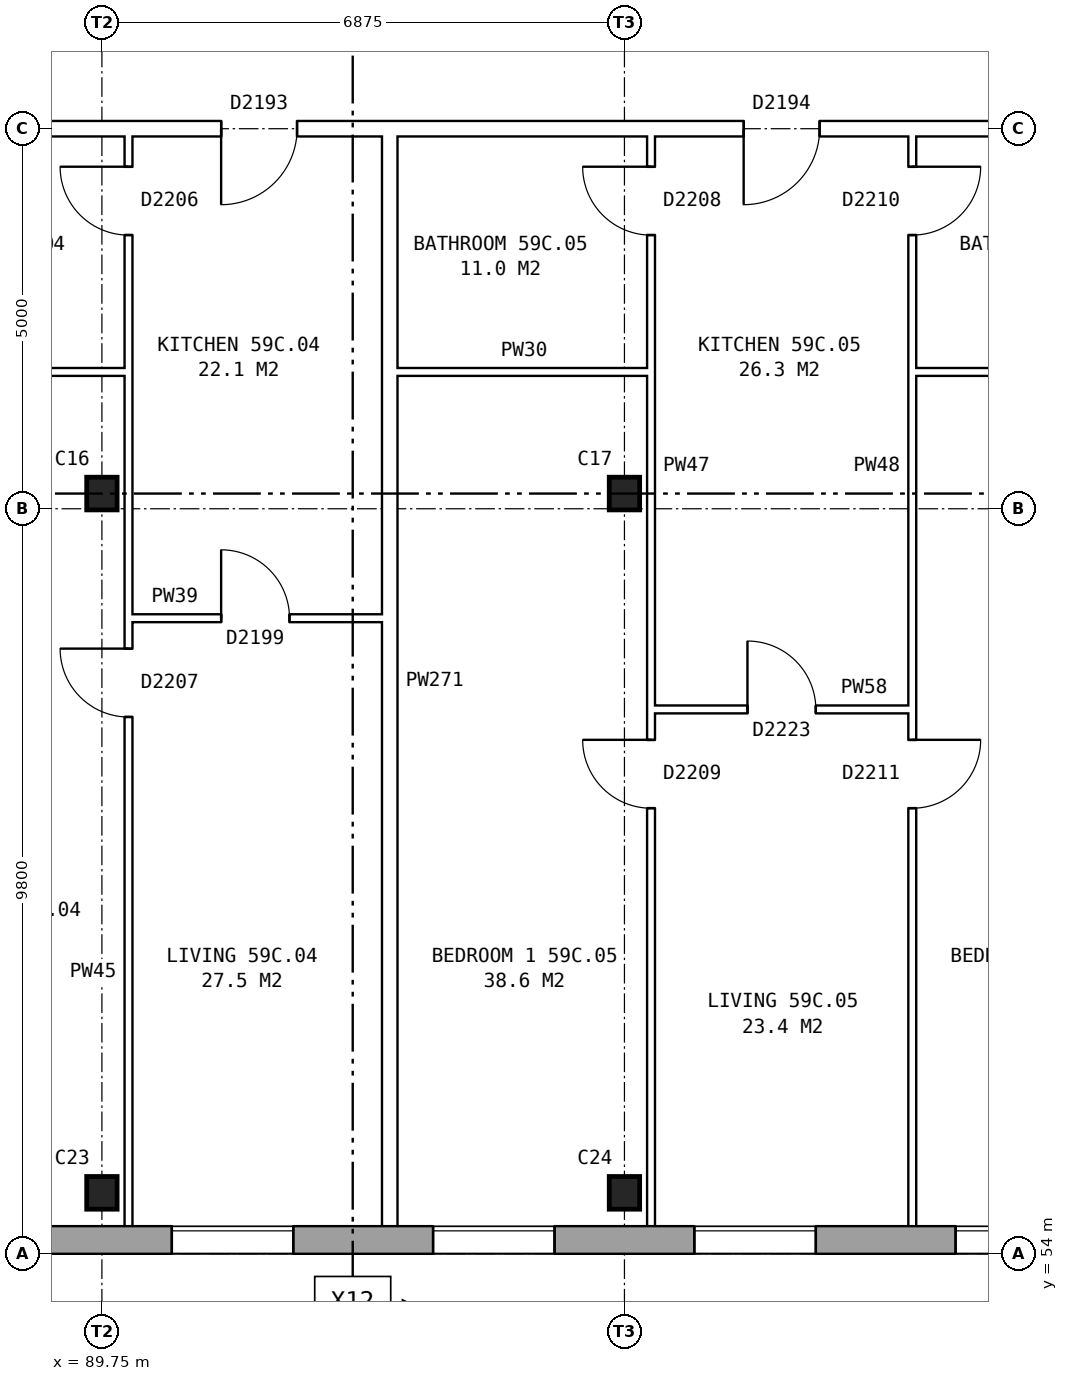
"""IFC4 building model, lengths in metres.
Left out: names, types, materials, properties, quantities, classifications, styles, units other than length and angle.
Written with IfcOpenShell. Run it as: python <this file> out.ifc"""

import sys

from ifc_helpers import new_model, si_unit, direction, frame, frame_2d, origin, origin_2d, place, context, subcontext, project, spatial, rectangle, i_section, extrude, element, fill, save


model = new_model("IFC4")
c1 = context("Model", 3, precision=1e-05, world=origin(), true_north=direction((0.0, 1.0)))
c2 = subcontext(c1, "Body", "Model", "MODEL_VIEW")
j1 = project(units=[si_unit("LENGTHUNIT", "METRE"), si_unit("PLANEANGLEUNIT", "RADIAN")], contexts=[c1])
p1 = place(None, origin())
s1 = spatial("IfcSite", under=j1, at=p1, CompositionType="ELEMENT")
p2 = place(p1, origin())
s2 = spatial("IfcBuilding", under=s1, at=p2, CompositionType="ELEMENT")
p3 = place(p2, frame((0.0, 0.0, 209.0)))
s3 = spatial("IfcBuildingStorey", under=s2, at=p3, CompositionType="ELEMENT", Elevation=209.0)
for number, where, z_axis, x_axis in (
    (1, (89.75, 54.8, 0.0), (0.0, 0.0, 1.0), (1.0, 0.0, 0.0)),
    (2, (96.625, 54.8, 0.0), (0.0, 0.0, 1.0), (1.0, 0.0, 0.0)),
    (3, (89.75, 64.0, 0.0), (0.0, 0.0, 1.0), (1.0, 0.0, 0.0)),
    (4, (96.625, 64.0, 0.0), (0.0, 0.0, 1.0), (1.0, 0.0, 0.0)),
):
    element("IfcColumn", number, at=place(p3, frame(where, z_axis=z_axis, x_axis=x_axis)), inside=s3, PredefinedType="COLUMN", context=c2, shape_type="SweptSolid", body=[
        extrude(i_section(OverallWidth=0.4, OverallDepth=0.43, WebThickness=0.04, FlangeThickness=0.04, at=origin_2d()), origin(), (0.0, 0.0, 1.0), 2.85),
    ])
p4 = place(p3, frame((75.95, 54.18, 0.0), z_axis=(0.0, 0.0, 1.0), x_axis=(1.0, 0.0, 0.0)))
e5 = element("IfcWall", 5, at=p4, inside=s3, PredefinedType="STANDARD", context=c2, shape_type="SweptSolid", body=[
    extrude(rectangle(XDim=55.1, YDim=0.36, at=frame_2d((27.55, 0.0))), origin(), (0.0, 0.0, 1.0), 2.85),
])
p5 = place(p4, frame((0.969, 0.0, 0.8)))
e6 = element("IfcOpeningElement", 6, at=p5, cuts=e5, PredefinedType="OPENING", context=c2, shape_type="SweptSolid", body=[
    extrude(rectangle(XDim=1.6, YDim=1.8, at=frame_2d((0.8, 0.9))), frame((0.0, 0.19, 0.0), z_axis=(0.0, -1.0, 0.0), x_axis=(1.0, 0.0, 0.0)), (0.0, 0.0, 1.0), 0.38),
])
p6 = place(p4, frame((4.406, 0.0, 0.8)))
e7 = element("IfcOpeningElement", 7, at=p6, cuts=e5, PredefinedType="OPENING", context=c2, shape_type="SweptSolid", body=[
    extrude(rectangle(XDim=1.6, YDim=1.8, at=frame_2d((0.8, 0.9))), frame((0.0, 0.19, 0.0), z_axis=(0.0, -1.0, 0.0), x_axis=(1.0, 0.0, 0.0)), (0.0, 0.0, 1.0), 0.38),
])
p7 = place(p4, frame((7.844, 0.0, 0.8)))
e8 = element("IfcOpeningElement", 8, at=p7, cuts=e5, PredefinedType="OPENING", context=c2, shape_type="SweptSolid", body=[
    extrude(rectangle(XDim=1.6, YDim=1.8, at=frame_2d((0.8, 0.9))), frame((0.0, 0.19, 0.0), z_axis=(0.0, -1.0, 0.0), x_axis=(1.0, 0.0, 0.0)), (0.0, 0.0, 1.0), 0.38),
])
p8 = place(p4, frame((11.281, 0.0, 0.8)))
e9 = element("IfcOpeningElement", 9, at=p8, cuts=e5, PredefinedType="OPENING", context=c2, shape_type="SweptSolid", body=[
    extrude(rectangle(XDim=1.6, YDim=1.8, at=frame_2d((0.8, 0.9))), frame((0.0, 0.19, 0.0), z_axis=(0.0, -1.0, 0.0), x_axis=(1.0, 0.0, 0.0)), (0.0, 0.0, 1.0), 0.38),
])
p9 = place(p4, frame((14.719, 0.0, 0.8)))
e10 = element("IfcOpeningElement", 10, at=p9, cuts=e5, PredefinedType="OPENING", context=c2, shape_type="SweptSolid", body=[
    extrude(rectangle(XDim=1.6, YDim=1.8, at=frame_2d((0.8, 0.9))), frame((0.0, 0.19, 0.0), z_axis=(0.0, -1.0, 0.0), x_axis=(1.0, 0.0, 0.0)), (0.0, 0.0, 1.0), 0.38),
])
p10 = place(p4, frame((18.156, 0.0, 0.8)))
e11 = element("IfcOpeningElement", 11, at=p10, cuts=e5, PredefinedType="OPENING", context=c2, shape_type="SweptSolid", body=[
    extrude(rectangle(XDim=1.6, YDim=1.8, at=frame_2d((0.8, 0.9))), frame((0.0, 0.19, 0.0), z_axis=(0.0, -1.0, 0.0), x_axis=(1.0, 0.0, 0.0)), (0.0, 0.0, 1.0), 0.38),
])
p11 = place(p4, frame((21.594, 0.0, 0.8)))
e12 = element("IfcOpeningElement", 12, at=p11, cuts=e5, PredefinedType="OPENING", context=c2, shape_type="SweptSolid", body=[
    extrude(rectangle(XDim=1.6, YDim=1.8, at=frame_2d((0.8, 0.9))), frame((0.0, 0.19, 0.0), z_axis=(0.0, -1.0, 0.0), x_axis=(1.0, 0.0, 0.0)), (0.0, 0.0, 1.0), 0.38),
])
p12 = place(p4, frame((25.031, 0.0, 0.8)))
e13 = element("IfcOpeningElement", 13, at=p12, cuts=e5, PredefinedType="OPENING", context=c2, shape_type="SweptSolid", body=[
    extrude(rectangle(XDim=1.6, YDim=1.8, at=frame_2d((0.8, 0.9))), frame((0.0, 0.19, 0.0), z_axis=(0.0, -1.0, 0.0), x_axis=(1.0, 0.0, 0.0)), (0.0, 0.0, 1.0), 0.38),
])
p13 = place(p4, frame((28.469, 0.0, 0.8)))
e14 = element("IfcOpeningElement", 14, at=p13, cuts=e5, PredefinedType="OPENING", context=c2, shape_type="SweptSolid", body=[
    extrude(rectangle(XDim=1.6, YDim=1.8, at=frame_2d((0.8, 0.9))), frame((0.0, 0.19, 0.0), z_axis=(0.0, -1.0, 0.0), x_axis=(1.0, 0.0, 0.0)), (0.0, 0.0, 1.0), 0.38),
])
p14 = place(p4, frame((31.906, 0.0, 0.8)))
e15 = element("IfcOpeningElement", 15, at=p14, cuts=e5, PredefinedType="OPENING", context=c2, shape_type="SweptSolid", body=[
    extrude(rectangle(XDim=1.6, YDim=1.8, at=frame_2d((0.8, 0.9))), frame((0.0, 0.19, 0.0), z_axis=(0.0, -1.0, 0.0), x_axis=(1.0, 0.0, 0.0)), (0.0, 0.0, 1.0), 0.38),
])
p15 = place(p4, frame((35.344, 0.0, 0.8)))
e16 = element("IfcOpeningElement", 16, at=p15, cuts=e5, PredefinedType="OPENING", context=c2, shape_type="SweptSolid", body=[
    extrude(rectangle(XDim=1.6, YDim=1.8, at=frame_2d((0.8, 0.9))), frame((0.0, 0.19, 0.0), z_axis=(0.0, -1.0, 0.0), x_axis=(1.0, 0.0, 0.0)), (0.0, 0.0, 1.0), 0.38),
])
p16 = place(p4, frame((38.781, 0.0, 0.8)))
e17 = element("IfcOpeningElement", 17, at=p16, cuts=e5, PredefinedType="OPENING", context=c2, shape_type="SweptSolid", body=[
    extrude(rectangle(XDim=1.6, YDim=1.8, at=frame_2d((0.8, 0.9))), frame((0.0, 0.19, 0.0), z_axis=(0.0, -1.0, 0.0), x_axis=(1.0, 0.0, 0.0)), (0.0, 0.0, 1.0), 0.38),
])
p17 = place(p4, frame((42.219, 0.0, 0.8)))
e18 = element("IfcOpeningElement", 18, at=p17, cuts=e5, PredefinedType="OPENING", context=c2, shape_type="SweptSolid", body=[
    extrude(rectangle(XDim=1.6, YDim=1.8, at=frame_2d((0.8, 0.9))), frame((0.0, 0.19, 0.0), z_axis=(0.0, -1.0, 0.0), x_axis=(1.0, 0.0, 0.0)), (0.0, 0.0, 1.0), 0.38),
])
p18 = place(p4, frame((45.656, 0.0, 0.8)))
e19 = element("IfcOpeningElement", 19, at=p18, cuts=e5, PredefinedType="OPENING", context=c2, shape_type="SweptSolid", body=[
    extrude(rectangle(XDim=1.6, YDim=1.8, at=frame_2d((0.8, 0.9))), frame((0.0, 0.19, 0.0), z_axis=(0.0, -1.0, 0.0), x_axis=(1.0, 0.0, 0.0)), (0.0, 0.0, 1.0), 0.38),
])
p19 = place(p4, frame((49.094, 0.0, 0.8)))
e20 = element("IfcOpeningElement", 20, at=p19, cuts=e5, PredefinedType="OPENING", context=c2, shape_type="SweptSolid", body=[
    extrude(rectangle(XDim=1.6, YDim=1.8, at=frame_2d((0.8, 0.9))), frame((0.0, 0.19, 0.0), z_axis=(0.0, -1.0, 0.0), x_axis=(1.0, 0.0, 0.0)), (0.0, 0.0, 1.0), 0.38),
])
p20 = place(p4, frame((52.531, 0.0, 0.8)))
e21 = element("IfcOpeningElement", 21, at=p20, cuts=e5, PredefinedType="OPENING", context=c2, shape_type="SweptSolid", body=[
    extrude(rectangle(XDim=1.6, YDim=1.8, at=frame_2d((0.8, 0.9))), frame((0.0, 0.19, 0.0), z_axis=(0.0, -1.0, 0.0), x_axis=(1.0, 0.0, 0.0)), (0.0, 0.0, 1.0), 0.38),
])
p21 = place(p3, frame((96.975, 61.16, 0.0), z_axis=(0.0, 0.0, 1.0), x_axis=(1.0, 0.0, 0.0)))
e22 = element("IfcWall", 22, at=p21, inside=s3, PredefinedType="PARTITIONING", context=c2, shape_type="SweptSolid", body=[
    extrude(rectangle(XDim=3.437, YDim=0.1, at=frame_2d((1.719, 0.0))), origin(), (0.0, 0.0, 1.0), 2.85),
])
p22 = place(p21, frame((1.269, 0.0, 0.0)))
e23 = element("IfcOpeningElement", 23, at=p22, cuts=e22, PredefinedType="OPENING", context=c2, shape_type="SweptSolid", body=[
    extrude(rectangle(XDim=0.9, YDim=2.1, at=frame_2d((0.45, 1.05))), frame((0.0, 0.06, 0.0), z_axis=(0.0, -1.0, 0.0), x_axis=(1.0, 0.0, 0.0)), (0.0, 0.0, 1.0), 0.12),
])
p23 = place(p3, frame((90.1, 62.36, 0.0), z_axis=(0.0, 0.0, 1.0), x_axis=(1.0, 0.0, 0.0)))
e24 = element("IfcWall", 24, at=p23, inside=s3, PredefinedType="PARTITIONING", context=c2, shape_type="SweptSolid", body=[
    extrude(rectangle(XDim=3.337, YDim=0.1, at=frame_2d((1.668, 0.0))), origin(), (0.0, 0.0, 1.0), 2.85),
])
p24 = place(p23, frame((1.219, 0.0, 0.0)))
e25 = element("IfcOpeningElement", 25, at=p24, cuts=e24, PredefinedType="OPENING", context=c2, shape_type="SweptSolid", body=[
    extrude(rectangle(XDim=0.9, YDim=2.1, at=frame_2d((0.45, 1.05))), frame((0.0, 0.06, 0.0), z_axis=(0.0, -1.0, 0.0), x_axis=(1.0, 0.0, 0.0)), (0.0, 0.0, 1.0), 0.12),
])
for number, where, z_axis, x_axis in (
    (26, (86.762, 65.6, 0.0), (0.0, 0.0, 1.0), (1.0, 0.0, 0.0)),
    (27, (93.637, 65.6, 0.0), (0.0, 0.0, 1.0), (1.0, 0.0, 0.0)),
):
    element("IfcWall", number, at=place(p3, frame(where, z_axis=z_axis, x_axis=x_axis)), inside=s3, PredefinedType="PARTITIONING", context=c2, shape_type="SweptSolid", body=[
        extrude(rectangle(XDim=3.338, YDim=0.1, at=frame_2d((1.669, 0.0))), origin(), (0.0, 0.0, 1.0), 2.85),
    ])
p25 = place(p3, frame((100.412, 65.6, 0.0), z_axis=(0.0, 0.0, 1.0), x_axis=(1.0, 0.0, 0.0)))
e28 = element("IfcWall", 28, at=p25, inside=s3, PredefinedType="PARTITIONING", context=c2, shape_type="SweptSolid", body=[
    extrude(rectangle(XDim=6.875, YDim=0.1, at=frame_2d((3.438, 0.0))), origin(), (0.0, 0.0, 1.0), 2.85),
])
p26 = place(p3, frame((75.64, 68.8, 0.0), z_axis=(0.0, 0.0, 1.0), x_axis=(1.0, 0.0, 0.0)))
e29 = element("IfcWall", 29, at=p26, inside=s3, PredefinedType="PARTITIONING", context=c2, shape_type="SweptSolid", body=[
    extrude(rectangle(XDim=55.72, YDim=0.2, at=frame_2d((27.86, 0.0))), origin(), (0.0, 0.0, 1.0), 2.85),
])
p27 = place(p26, frame((5.191, 0.0, 0.0)))
e30 = element("IfcOpeningElement", 30, at=p27, cuts=e29, PredefinedType="OPENING", context=c2, shape_type="SweptSolid", body=[
    extrude(rectangle(XDim=1.0, YDim=2.1, at=frame_2d((0.5, 1.05))), frame((0.0, 0.11, 0.0), z_axis=(0.0, -1.0, 0.0), x_axis=(1.0, 0.0, 0.0)), (0.0, 0.0, 1.0), 0.22),
])
p28 = place(p26, frame((15.678, 0.0, 0.0)))
e31 = element("IfcOpeningElement", 31, at=p28, cuts=e29, PredefinedType="OPENING", context=c2, shape_type="SweptSolid", body=[
    extrude(rectangle(XDim=1.0, YDim=2.1, at=frame_2d((0.5, 1.05))), frame((0.0, 0.11, 0.0), z_axis=(0.0, -1.0, 0.0), x_axis=(1.0, 0.0, 0.0)), (0.0, 0.0, 1.0), 0.22),
])
p29 = place(p26, frame((22.553, 0.0, 0.0)))
e32 = element("IfcOpeningElement", 32, at=p29, cuts=e29, PredefinedType="OPENING", context=c2, shape_type="SweptSolid", body=[
    extrude(rectangle(XDim=1.0, YDim=2.1, at=frame_2d((0.5, 1.05))), frame((0.0, 0.11, 0.0), z_axis=(0.0, -1.0, 0.0), x_axis=(1.0, 0.0, 0.0)), (0.0, 0.0, 1.0), 0.22),
])
p30 = place(p26, frame((32.866, 0.0, 0.0)))
e33 = element("IfcOpeningElement", 33, at=p30, cuts=e29, PredefinedType="OPENING", context=c2, shape_type="SweptSolid", body=[
    extrude(rectangle(XDim=1.0, YDim=2.1, at=frame_2d((0.5, 1.05))), frame((0.0, 0.11, 0.0), z_axis=(0.0, -1.0, 0.0), x_axis=(1.0, 0.0, 0.0)), (0.0, 0.0, 1.0), 0.22),
])
p31 = place(p26, frame((43.178, 0.0, 0.0)))
e34 = element("IfcOpeningElement", 34, at=p31, cuts=e29, PredefinedType="OPENING", context=c2, shape_type="SweptSolid", body=[
    extrude(rectangle(XDim=1.0, YDim=2.1, at=frame_2d((0.5, 1.05))), frame((0.0, 0.11, 0.0), z_axis=(0.0, -1.0, 0.0), x_axis=(1.0, 0.0, 0.0)), (0.0, 0.0, 1.0), 0.22),
])
p32 = place(p26, frame((50.053, 0.0, 0.0)))
e35 = element("IfcOpeningElement", 35, at=p32, cuts=e29, PredefinedType="OPENING", context=c2, shape_type="SweptSolid", body=[
    extrude(rectangle(XDim=1.0, YDim=2.1, at=frame_2d((0.5, 1.05))), frame((0.0, 0.11, 0.0), z_axis=(0.0, -1.0, 0.0), x_axis=(1.0, 0.0, 0.0)), (0.0, 0.0, 1.0), 0.22),
])
p33 = place(p3, frame((90.1, 54.36, 0.0), z_axis=(0.0, 0.0, 1.0), x_axis=(0.0, 1.0, 0.0)))
e36 = element("IfcWall", 36, at=p33, inside=s3, PredefinedType="PARTITIONING", context=c2, shape_type="SweptSolid", body=[
    extrude(rectangle(XDim=14.34, YDim=0.1, at=frame_2d((7.17, 0.0))), origin(), (0.0, 0.0, 1.0), 2.85),
])
p34 = place(p33, frame((6.7, 0.0, 0.0)))
e37 = element("IfcOpeningElement", 37, at=p34, cuts=e36, PredefinedType="OPENING", context=c2, shape_type="SweptSolid", body=[
    extrude(rectangle(XDim=0.9, YDim=2.1, at=frame_2d((0.45, 1.05))), frame((0.0, 0.06, 0.0), z_axis=(0.0, -1.0, 0.0), x_axis=(1.0, 0.0, 0.0)), (0.0, 0.0, 1.0), 0.12),
])
p35 = place(p33, frame((13.04, 0.0, 0.0)))
e38 = element("IfcOpeningElement", 38, at=p35, cuts=e36, PredefinedType="OPENING", context=c2, shape_type="SweptSolid", body=[
    extrude(rectangle(XDim=0.9, YDim=2.1, at=frame_2d((0.45, 1.05))), frame((0.0, 0.06, 0.0), z_axis=(0.0, -1.0, 0.0), x_axis=(1.0, 0.0, 0.0)), (0.0, 0.0, 1.0), 0.12),
])
p36 = place(p3, frame((93.537, 54.36, 0.0), z_axis=(0.0, 0.0, 1.0), x_axis=(0.0, 1.0, 0.0)))
e39 = element("IfcWall", 39, at=p36, inside=s3, PredefinedType="PARTITIONING", context=c2, shape_type="SweptSolid", body=[
    extrude(rectangle(XDim=14.34, YDim=0.2, at=frame_2d((7.17, 0.0))), origin(), (0.0, 0.0, 1.0), 2.85),
])
p37 = place(p3, frame((96.975, 54.36, 0.0), z_axis=(0.0, 0.0, 1.0), x_axis=(0.0, 1.0, 0.0)))
e40 = element("IfcWall", 40, at=p37, inside=s3, PredefinedType="PARTITIONING", context=c2, shape_type="SweptSolid", body=[
    extrude(rectangle(XDim=14.34, YDim=0.1, at=frame_2d((7.17, 0.0))), origin(), (0.0, 0.0, 1.0), 2.85),
])
p38 = place(p37, frame((5.5, 0.0, 0.0)))
e41 = element("IfcOpeningElement", 41, at=p38, cuts=e40, PredefinedType="OPENING", context=c2, shape_type="SweptSolid", body=[
    extrude(rectangle(XDim=0.9, YDim=2.1, at=frame_2d((0.45, 1.05))), frame((0.0, 0.06, 0.0), z_axis=(0.0, -1.0, 0.0), x_axis=(1.0, 0.0, 0.0)), (0.0, 0.0, 1.0), 0.12),
])
p39 = place(p37, frame((13.04, 0.0, 0.0)))
e42 = element("IfcOpeningElement", 42, at=p39, cuts=e40, PredefinedType="OPENING", context=c2, shape_type="SweptSolid", body=[
    extrude(rectangle(XDim=0.9, YDim=2.1, at=frame_2d((0.45, 1.05))), frame((0.0, 0.06, 0.0), z_axis=(0.0, -1.0, 0.0), x_axis=(1.0, 0.0, 0.0)), (0.0, 0.0, 1.0), 0.12),
])
p40 = place(p3, frame((100.412, 54.36, 0.0), z_axis=(0.0, 0.0, 1.0), x_axis=(0.0, 1.0, 0.0)))
e43 = element("IfcWall", 43, at=p40, inside=s3, PredefinedType="PARTITIONING", context=c2, shape_type="SweptSolid", body=[
    extrude(rectangle(XDim=14.34, YDim=0.1, at=frame_2d((7.17, 0.0))), origin(), (0.0, 0.0, 1.0), 2.85),
])
p41 = place(p40, frame((5.5, 0.0, 0.0)))
e44 = element("IfcOpeningElement", 44, at=p41, cuts=e43, PredefinedType="OPENING", context=c2, shape_type="SweptSolid", body=[
    extrude(rectangle(XDim=0.9, YDim=2.1, at=frame_2d((0.45, 1.05))), frame((0.0, 0.06, 0.0), z_axis=(0.0, -1.0, 0.0), x_axis=(1.0, 0.0, 0.0)), (0.0, 0.0, 1.0), 0.12),
])
p42 = place(p40, frame((13.04, 0.0, 0.0)))
e45 = element("IfcOpeningElement", 45, at=p42, cuts=e43, PredefinedType="OPENING", context=c2, shape_type="SweptSolid", body=[
    extrude(rectangle(XDim=0.9, YDim=2.1, at=frame_2d((0.45, 1.05))), frame((0.0, 0.06, 0.0), z_axis=(0.0, -1.0, 0.0), x_axis=(1.0, 0.0, 0.0)), (0.0, 0.0, 1.0), 0.12),
])
p43 = place(p9, origin())
e46 = element("IfcWindow", 46, at=p43, inside=s3, PartitioningType="SINGLE_PANEL", PredefinedType="WINDOW", context=c2, shape_type="SweptSolid", body=[
    extrude(rectangle(XDim=1.6, YDim=1.8, at=frame_2d((0.8, 0.9))), frame((0.0, 0.15, 0.0), z_axis=(0.0, -1.0, 0.0), x_axis=(1.0, 0.0, 0.0)), (0.0, 0.0, 1.0), 0.06),
])
fill(e10, e46)
p44 = place(p10, origin())
e47 = element("IfcWindow", 47, at=p44, inside=s3, PartitioningType="SINGLE_PANEL", PredefinedType="WINDOW", context=c2, shape_type="SweptSolid", body=[
    extrude(rectangle(XDim=1.6, YDim=1.8, at=frame_2d((0.8, 0.9))), frame((0.0, 0.15, 0.0), z_axis=(0.0, -1.0, 0.0), x_axis=(1.0, 0.0, 0.0)), (0.0, 0.0, 1.0), 0.06),
])
fill(e11, e47)
p45 = place(p11, origin())
e48 = element("IfcWindow", 48, at=p45, inside=s3, PartitioningType="SINGLE_PANEL", PredefinedType="WINDOW", context=c2, shape_type="SweptSolid", body=[
    extrude(rectangle(XDim=1.6, YDim=1.8, at=frame_2d((0.8, 0.9))), frame((0.0, 0.15, 0.0), z_axis=(0.0, -1.0, 0.0), x_axis=(1.0, 0.0, 0.0)), (0.0, 0.0, 1.0), 0.06),
])
fill(e12, e48)
p46 = place(p12, origin())
e49 = element("IfcWindow", 49, at=p46, inside=s3, PartitioningType="SINGLE_PANEL", PredefinedType="WINDOW", context=c2, shape_type="SweptSolid", body=[
    extrude(rectangle(XDim=1.6, YDim=1.8, at=frame_2d((0.8, 0.9))), frame((0.0, 0.15, 0.0), z_axis=(0.0, -1.0, 0.0), x_axis=(1.0, 0.0, 0.0)), (0.0, 0.0, 1.0), 0.06),
])
fill(e13, e49)
p47 = place(p34, origin())
e50 = element("IfcDoor", 50, at=p47, inside=s3, OperationType="SINGLE_SWING_RIGHT", PredefinedType="DOOR", context=c2, shape_type="SweptSolid", body=[
    extrude(rectangle(XDim=0.9, YDim=2.1, at=frame_2d((0.45, 1.05))), frame((0.0, 0.025, 0.0), z_axis=(0.0, -1.0, 0.0), x_axis=(1.0, 0.0, 0.0)), (0.0, 0.0, 1.0), 0.05),
])
fill(e37, e50)
p48 = place(p28, frame((1.0, 0.0, 0.0), z_axis=(0.0, 0.0, 1.0), x_axis=(-1.0, 0.0, 0.0)))
e51 = element("IfcDoor", 51, at=p48, inside=s3, OperationType="SINGLE_SWING_RIGHT", PredefinedType="DOOR", context=c2, shape_type="SweptSolid", body=[
    extrude(rectangle(XDim=1.0, YDim=2.1, at=frame_2d((0.5, 1.05))), frame((0.0, 0.025, 0.0), z_axis=(0.0, -1.0, 0.0), x_axis=(1.0, 0.0, 0.0)), (0.0, 0.0, 1.0), 0.05),
])
fill(e31, e51)
p49 = place(p24, origin())
e52 = element("IfcDoor", 52, at=p49, inside=s3, OperationType="SINGLE_SWING_LEFT", PredefinedType="DOOR", context=c2, shape_type="SweptSolid", body=[
    extrude(rectangle(XDim=0.9, YDim=2.1, at=frame_2d((0.45, 1.05))), frame((0.0, 0.025, 0.0), z_axis=(0.0, -1.0, 0.0), x_axis=(1.0, 0.0, 0.0)), (0.0, 0.0, 1.0), 0.05),
])
fill(e25, e52)
p50 = place(p35, origin())
e53 = element("IfcDoor", 53, at=p50, inside=s3, OperationType="SINGLE_SWING_RIGHT", PredefinedType="DOOR", context=c2, shape_type="SweptSolid", body=[
    extrude(rectangle(XDim=0.9, YDim=2.1, at=frame_2d((0.45, 1.05))), frame((0.0, 0.025, 0.0), z_axis=(0.0, -1.0, 0.0), x_axis=(1.0, 0.0, 0.0)), (0.0, 0.0, 1.0), 0.05),
])
fill(e38, e53)
p51 = place(p38, origin())
e54 = element("IfcDoor", 54, at=p51, inside=s3, OperationType="SINGLE_SWING_RIGHT", PredefinedType="DOOR", context=c2, shape_type="SweptSolid", body=[
    extrude(rectangle(XDim=0.9, YDim=2.1, at=frame_2d((0.45, 1.05))), frame((0.0, 0.025, 0.0), z_axis=(0.0, -1.0, 0.0), x_axis=(1.0, 0.0, 0.0)), (0.0, 0.0, 1.0), 0.05),
])
fill(e41, e54)
p52 = place(p41, frame((0.9, 0.0, 0.0), z_axis=(0.0, 0.0, 1.0), x_axis=(-1.0, 0.0, 0.0)))
e55 = element("IfcDoor", 55, at=p52, inside=s3, OperationType="SINGLE_SWING_LEFT", PredefinedType="DOOR", context=c2, shape_type="SweptSolid", body=[
    extrude(rectangle(XDim=0.9, YDim=2.1, at=frame_2d((0.45, 1.05))), frame((0.0, 0.025, 0.0), z_axis=(0.0, -1.0, 0.0), x_axis=(1.0, 0.0, 0.0)), (0.0, 0.0, 1.0), 0.05),
])
fill(e44, e55)
p53 = place(p29, frame((1.0, 0.0, 0.0), z_axis=(0.0, 0.0, 1.0), x_axis=(-1.0, 0.0, 0.0)))
e56 = element("IfcDoor", 56, at=p53, inside=s3, OperationType="SINGLE_SWING_RIGHT", PredefinedType="DOOR", context=c2, shape_type="SweptSolid", body=[
    extrude(rectangle(XDim=1.0, YDim=2.1, at=frame_2d((0.5, 1.05))), frame((0.0, 0.025, 0.0), z_axis=(0.0, -1.0, 0.0), x_axis=(1.0, 0.0, 0.0)), (0.0, 0.0, 1.0), 0.05),
])
fill(e32, e56)
p54 = place(p22, origin())
e57 = element("IfcDoor", 57, at=p54, inside=s3, OperationType="SINGLE_SWING_LEFT", PredefinedType="DOOR", context=c2, shape_type="SweptSolid", body=[
    extrude(rectangle(XDim=0.9, YDim=2.1, at=frame_2d((0.45, 1.05))), frame((0.0, 0.025, 0.0), z_axis=(0.0, -1.0, 0.0), x_axis=(1.0, 0.0, 0.0)), (0.0, 0.0, 1.0), 0.05),
])
fill(e23, e57)
p55 = place(p39, origin())
e58 = element("IfcDoor", 58, at=p55, inside=s3, OperationType="SINGLE_SWING_RIGHT", PredefinedType="DOOR", context=c2, shape_type="SweptSolid", body=[
    extrude(rectangle(XDim=0.9, YDim=2.1, at=frame_2d((0.45, 1.05))), frame((0.0, 0.025, 0.0), z_axis=(0.0, -1.0, 0.0), x_axis=(1.0, 0.0, 0.0)), (0.0, 0.0, 1.0), 0.05),
])
fill(e42, e58)
p56 = place(p42, frame((0.9, 0.0, 0.0), z_axis=(0.0, 0.0, 1.0), x_axis=(-1.0, 0.0, 0.0)))
e59 = element("IfcDoor", 59, at=p56, inside=s3, OperationType="SINGLE_SWING_LEFT", PredefinedType="DOOR", context=c2, shape_type="SweptSolid", body=[
    extrude(rectangle(XDim=0.9, YDim=2.1, at=frame_2d((0.45, 1.05))), frame((0.0, 0.025, 0.0), z_axis=(0.0, -1.0, 0.0), x_axis=(1.0, 0.0, 0.0)), (0.0, 0.0, 1.0), 0.05),
])
fill(e45, e59)
save(model, sys.argv[1])
